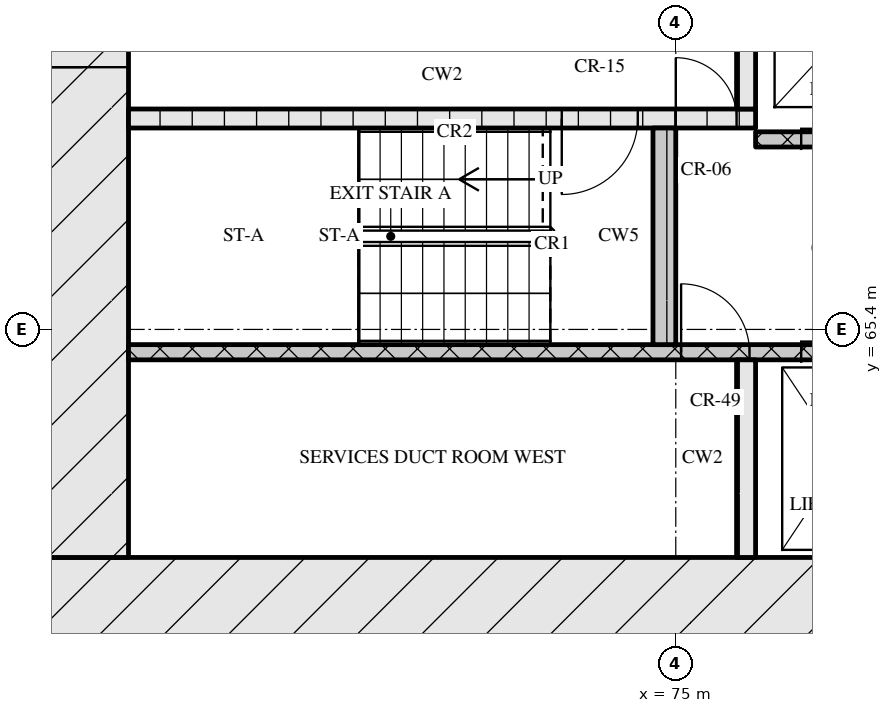
"""IFC4 building model, lengths in metres.
Left out: names, types, materials, properties, quantities, classifications, styles, units other than length and angle.
Written with IfcOpenShell. Run it as: python <this file> out.ifc"""

import sys

from ifc_helpers import new_model, si_unit, direction, frame, frame_2d, origin, place, context, subcontext, project, spatial, rectangle, extrude, element, fill, save


model = new_model("IFC4")
c1 = context("Model", 3, precision=1e-05, world=origin(), true_north=direction((0.0, 1.0)))
c2 = subcontext(c1, "Body", "Model", "MODEL_VIEW")
j1 = project(units=[si_unit("LENGTHUNIT", "METRE"), si_unit("PLANEANGLEUNIT", "RADIAN")], contexts=[c1])
p1 = place(None, origin())
s1 = spatial("IfcSite", under=j1, at=p1, CompositionType="ELEMENT")
p2 = place(p1, origin())
s2 = spatial("IfcBuilding", under=s1, at=p2, CompositionType="ELEMENT")
p3 = place(p2, frame((0.0, 0.0, 80.4)))
s3 = spatial("IfcBuildingStorey", under=s2, at=p3, CompositionType="ELEMENT", Elevation=80.4)
p4 = place(p3, frame((66.6, 61.8, 0.0), z_axis=(0.0, 0.0, 1.0), x_axis=(1.0, 0.0, 0.0)))
e1 = element("IfcWall", 1, at=p4, inside=s3, PredefinedType="SOLIDWALL", context=c2, shape_type="SweptSolid", body=[
    extrude(rectangle(XDim=42.0, YDim=1.2, at=frame_2d((21.0, 0.0))), origin(), (0.0, 0.0, 1.0), 3.3),
])
p5 = place(p4, frame((21.35, 0.0, 0.0)))
e2 = element("IfcOpeningElement", 2, at=p5, cuts=e1, PredefinedType="OPENING", context=c2, shape_type="SweptSolid", body=[
    extrude(rectangle(XDim=1.8, YDim=2.1, at=frame_2d((0.9, 1.05))), frame((0.0, 0.61, 0.0), z_axis=(0.0, -1.0, 0.0), x_axis=(1.0, 0.0, 0.0)), (0.0, 0.0, 1.0), 1.22),
])
p6 = place(p3, frame((67.2, 62.4, 0.0), z_axis=(0.0, 0.0, 1.0), x_axis=(0.0, 1.0, 0.0)))
e3 = element("IfcWall", 3, at=p6, inside=s3, PredefinedType="SOLIDWALL", context=c2, shape_type="SweptSolid", body=[
    extrude(rectangle(XDim=12.0, YDim=1.2, at=frame_2d((6.0, 0.0))), origin(), (0.0, 0.0, 1.0), 3.3),
])
p7 = place(p6, frame((6.45, 0.0, 0.0)))
e4 = element("IfcOpeningElement", 4, at=p7, cuts=e3, PredefinedType="OPENING", context=c2, shape_type="SweptSolid", body=[
    extrude(rectangle(XDim=1.2, YDim=2.1, at=frame_2d((0.6, 1.05))), frame((0.0, 0.61, 0.0), z_axis=(0.0, -1.0, 0.0), x_axis=(1.0, 0.0, 0.0)), (0.0, 0.0, 1.0), 1.22),
])
p8 = place(p3, frame((75.925, 62.4, 0.0), z_axis=(0.0, 0.0, 1.0), x_axis=(0.0, 1.0, 0.0)))
e5 = element("IfcWall", 5, at=p8, inside=s3, PredefinedType="SOLIDWALL", context=c2, shape_type="SweptSolid", body=[
    extrude(rectangle(XDim=2.6, YDim=0.25, at=frame_2d((1.3, 0.0))), origin(), (0.0, 0.0, 1.0), 3.3),
])
p9 = place(p3, frame((67.8, 65.1, 0.0), z_axis=(0.0, 0.0, 1.0), x_axis=(1.0, 0.0, 0.0)))
e6 = element("IfcWall", 6, at=p9, inside=s3, PredefinedType="SOLIDWALL", context=c2, shape_type="SweptSolid", body=[
    extrude(rectangle(XDim=18.5, YDim=0.2, at=frame_2d((9.25, 0.0))), origin(), (0.0, 0.0, 1.0), 3.3),
])
p10 = place(p9, frame((7.27, 0.0, 0.0)))
e7 = element("IfcOpeningElement", 7, at=p10, cuts=e6, PredefinedType="OPENING", context=c2, shape_type="SweptSolid", body=[
    extrude(rectangle(XDim=0.9, YDim=2.1, at=frame_2d((0.45, 1.05))), frame((0.0, 0.11, 0.0), z_axis=(0.0, -1.0, 0.0), x_axis=(1.0, 0.0, 0.0)), (0.0, 0.0, 1.0), 0.22),
])
p11 = place(p9, frame((8.85, 0.0, 0.0)))
e8 = element("IfcOpeningElement", 8, at=p11, cuts=e6, PredefinedType="OPENING", context=c2, shape_type="SweptSolid", body=[
    extrude(rectangle(XDim=1.1, YDim=2.1, at=frame_2d((0.55, 1.05))), frame((0.0, 0.11, 0.0), z_axis=(0.0, -1.0, 0.0), x_axis=(1.0, 0.0, 0.0)), (0.0, 0.0, 1.0), 0.22),
])
p12 = place(p9, frame((11.35, 0.0, 0.0)))
e9 = element("IfcOpeningElement", 9, at=p12, cuts=e6, PredefinedType="OPENING", context=c2, shape_type="SweptSolid", body=[
    extrude(rectangle(XDim=1.1, YDim=2.1, at=frame_2d((0.55, 1.05))), frame((0.0, 0.11, 0.0), z_axis=(0.0, -1.0, 0.0), x_axis=(1.0, 0.0, 0.0)), (0.0, 0.0, 1.0), 0.22),
])
p13 = place(p9, frame((13.85, 0.0, 0.0)))
e10 = element("IfcOpeningElement", 10, at=p13, cuts=e6, PredefinedType="OPENING", context=c2, shape_type="SweptSolid", body=[
    extrude(rectangle(XDim=1.1, YDim=2.1, at=frame_2d((0.55, 1.05))), frame((0.0, 0.11, 0.0), z_axis=(0.0, -1.0, 0.0), x_axis=(1.0, 0.0, 0.0)), (0.0, 0.0, 1.0), 0.22),
])
p14 = place(p9, frame((16.7, 0.0, 0.0)))
e11 = element("IfcOpeningElement", 11, at=p14, cuts=e6, PredefinedType="OPENING", context=c2, shape_type="SweptSolid", body=[
    extrude(rectangle(XDim=0.9, YDim=2.1, at=frame_2d((0.45, 1.05))), frame((0.0, 0.11, 0.0), z_axis=(0.0, -1.0, 0.0), x_axis=(1.0, 0.0, 0.0)), (0.0, 0.0, 1.0), 0.22),
])
p15 = place(p3, frame((74.85, 65.2, 0.0), z_axis=(0.0, 0.0, 1.0), x_axis=(0.0, 1.0, 0.0)))
e12 = element("IfcWall", 12, at=p15, inside=s3, PredefinedType="SOLIDWALL", context=c2, shape_type="SweptSolid", body=[
    extrude(rectangle(XDim=2.85, YDim=0.3, at=frame_2d((1.425, 0.0))), origin(), (0.0, 0.0, 1.0), 3.3),
])
p16 = place(p3, frame((76.05, 67.9, 0.0), z_axis=(0.0, 0.0, 1.0), x_axis=(1.0, 0.0, 0.0)))
e13 = element("IfcWall", 13, at=p16, inside=s3, PredefinedType="SOLIDWALL", context=c2, shape_type="SweptSolid", body=[
    extrude(rectangle(XDim=23.1, YDim=0.2, at=frame_2d((11.55, 0.0))), origin(), (0.0, 0.0, 1.0), 3.3),
])
p17 = place(p16, frame((0.6, 0.0, 0.0)))
e14 = element("IfcOpeningElement", 14, at=p17, cuts=e13, PredefinedType="OPENING", context=c2, shape_type="SweptSolid", body=[
    extrude(rectangle(XDim=1.1, YDim=2.1, at=frame_2d((0.55, 1.05))), frame((0.0, 0.11, 0.0), z_axis=(0.0, -1.0, 0.0), x_axis=(1.0, 0.0, 0.0)), (0.0, 0.0, 1.0), 0.22),
])
p18 = place(p16, frame((3.1, 0.0, 0.0)))
e15 = element("IfcOpeningElement", 15, at=p18, cuts=e13, PredefinedType="OPENING", context=c2, shape_type="SweptSolid", body=[
    extrude(rectangle(XDim=1.1, YDim=2.1, at=frame_2d((0.55, 1.05))), frame((0.0, 0.11, 0.0), z_axis=(0.0, -1.0, 0.0), x_axis=(1.0, 0.0, 0.0)), (0.0, 0.0, 1.0), 0.22),
])
p19 = place(p16, frame((5.6, 0.0, 0.0)))
e16 = element("IfcOpeningElement", 16, at=p19, cuts=e13, PredefinedType="OPENING", context=c2, shape_type="SweptSolid", body=[
    extrude(rectangle(XDim=1.1, YDim=2.1, at=frame_2d((0.55, 1.05))), frame((0.0, 0.11, 0.0), z_axis=(0.0, -1.0, 0.0), x_axis=(1.0, 0.0, 0.0)), (0.0, 0.0, 1.0), 0.22),
])
p20 = place(p16, frame((9.7, 0.0, 0.0)))
e17 = element("IfcOpeningElement", 17, at=p20, cuts=e13, PredefinedType="OPENING", context=c2, shape_type="SweptSolid", body=[
    extrude(rectangle(XDim=0.9, YDim=2.1, at=frame_2d((0.45, 1.05))), frame((0.0, 0.11, 0.0), z_axis=(0.0, -1.0, 0.0), x_axis=(1.0, 0.0, 0.0)), (0.0, 0.0, 1.0), 0.22),
])
p21 = place(p16, frame((13.55, 0.0, 0.0)))
e18 = element("IfcOpeningElement", 18, at=p21, cuts=e13, PredefinedType="OPENING", context=c2, shape_type="SweptSolid", body=[
    extrude(rectangle(XDim=1.0, YDim=2.1, at=frame_2d((0.5, 1.05))), frame((0.0, 0.11, 0.0), z_axis=(0.0, -1.0, 0.0), x_axis=(1.0, 0.0, 0.0)), (0.0, 0.0, 1.0), 0.22),
])
p22 = place(p3, frame((67.8, 68.175, 0.0), z_axis=(0.0, 0.0, 1.0), x_axis=(1.0, 0.0, 0.0)))
e19 = element("IfcWall", 19, at=p22, inside=s3, PredefinedType="SOLIDWALL", context=c2, shape_type="SweptSolid", body=[
    extrude(rectangle(XDim=8.25, YDim=0.25, at=frame_2d((4.125, 0.0))), origin(), (0.0, 0.0, 1.0), 3.3),
])
p23 = place(p22, frame((5.7, 0.0, 0.0)))
e20 = element("IfcOpeningElement", 20, at=p23, cuts=e19, PredefinedType="OPENING", context=c2, shape_type="SweptSolid", body=[
    extrude(rectangle(XDim=1.0, YDim=2.1, at=frame_2d((0.5, 1.05))), frame((0.0, 0.135, 0.0), z_axis=(0.0, -1.0, 0.0), x_axis=(1.0, 0.0, 0.0)), (0.0, 0.0, 1.0), 0.27),
])
p24 = place(p22, frame((7.2, 0.0, 0.0)))
e21 = element("IfcOpeningElement", 21, at=p24, cuts=e19, PredefinedType="OPENING", context=c2, shape_type="SweptSolid", body=[
    extrude(rectangle(XDim=0.8, YDim=2.1, at=frame_2d((0.4, 1.05))), frame((0.0, 0.135, 0.0), z_axis=(0.0, -1.0, 0.0), x_axis=(1.0, 0.0, 0.0)), (0.0, 0.0, 1.0), 0.27),
])
p25 = place(p3, frame((75.925, 68.3, 0.0), z_axis=(0.0, 0.0, 1.0), x_axis=(0.0, 1.0, 0.0)))
e22 = element("IfcWall", 22, at=p25, inside=s3, PredefinedType="SOLIDWALL", context=c2, shape_type="SweptSolid", body=[
    extrude(rectangle(XDim=2.3, YDim=0.25, at=frame_2d((1.15, 0.0))), origin(), (0.0, 0.0, 1.0), 3.3),
])
p26 = place(p10, origin())
e23 = element("IfcDoor", 23, at=p26, inside=s3, OperationType="SINGLE_SWING_LEFT", PredefinedType="DOOR", context=c2, shape_type="SweptSolid", body=[
    extrude(rectangle(XDim=0.9, YDim=2.1, at=frame_2d((0.45, 1.05))), frame((0.0, 0.025, 0.0), z_axis=(0.0, -1.0, 0.0), x_axis=(1.0, 0.0, 0.0)), (0.0, 0.0, 1.0), 0.05),
])
fill(e7, e23)
p27 = place(p11, origin())
e24 = element("IfcDoor", 24, at=p27, inside=s3, OperationType="SLIDING_TO_LEFT", PredefinedType="DOOR", context=c2, shape_type="SweptSolid", body=[
    extrude(rectangle(XDim=1.1, YDim=2.1, at=frame_2d((0.55, 1.05))), frame((0.0, 0.025, 0.0), z_axis=(0.0, -1.0, 0.0), x_axis=(1.0, 0.0, 0.0)), (0.0, 0.0, 1.0), 0.05),
])
fill(e8, e24)
p28 = place(p17, origin())
e25 = element("IfcDoor", 25, at=p28, inside=s3, OperationType="SLIDING_TO_RIGHT", PredefinedType="DOOR", context=c2, shape_type="SweptSolid", body=[
    extrude(rectangle(XDim=1.1, YDim=2.1, at=frame_2d((0.55, 1.05))), frame((0.0, 0.025, 0.0), z_axis=(0.0, -1.0, 0.0), x_axis=(1.0, 0.0, 0.0)), (0.0, 0.0, 1.0), 0.05),
])
fill(e14, e25)
p29 = place(p23, origin())
e26 = element("IfcDoor", 26, at=p29, inside=s3, OperationType="SINGLE_SWING_RIGHT", PredefinedType="DOOR", context=c2, shape_type="SweptSolid", body=[
    extrude(rectangle(XDim=1.0, YDim=2.1, at=frame_2d((0.5, 1.05))), frame((0.0, 0.025, 0.0), z_axis=(0.0, -1.0, 0.0), x_axis=(1.0, 0.0, 0.0)), (0.0, 0.0, 1.0), 0.05),
])
fill(e20, e26)
p30 = place(p24, origin())
e27 = element("IfcDoor", 27, at=p30, inside=s3, OperationType="SINGLE_SWING_LEFT", PredefinedType="DOOR", context=c2, shape_type="SweptSolid", body=[
    extrude(rectangle(XDim=0.8, YDim=2.1, at=frame_2d((0.4, 1.05))), frame((0.0, 0.025, 0.0), z_axis=(0.0, -1.0, 0.0), x_axis=(1.0, 0.0, 0.0)), (0.0, 0.0, 1.0), 0.05),
])
fill(e21, e27)
p31 = place(p7, origin())
e28 = element("IfcDoor", 28, at=p31, inside=s3, OperationType="SINGLE_SWING_LEFT", PredefinedType="DOOR", context=c2, shape_type="SweptSolid", body=[
    extrude(rectangle(XDim=1.2, YDim=2.1, at=frame_2d((0.6, 1.05))), frame((0.0, 0.025, 0.0), z_axis=(0.0, -1.0, 0.0), x_axis=(1.0, 0.0, 0.0)), (0.0, 0.0, 1.0), 0.05),
])
fill(e4, e28)
save(model, sys.argv[1])
